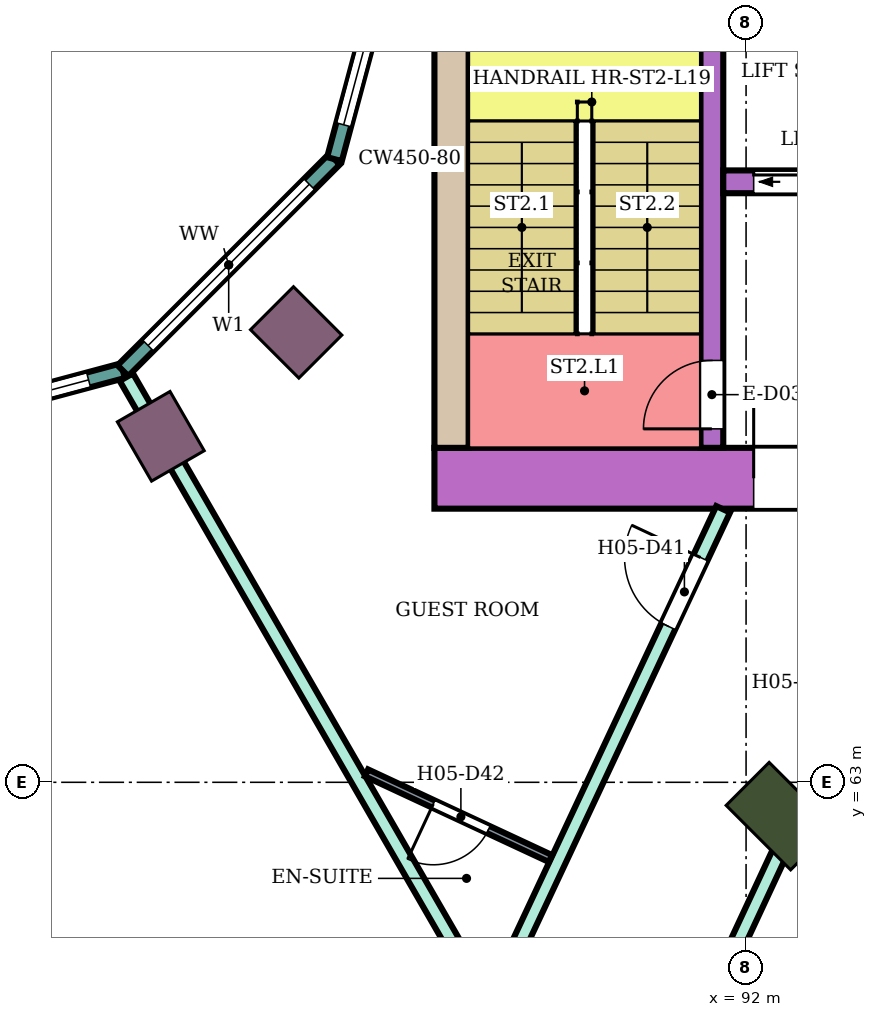
"""IFC4 building model, lengths in metres.
Left out: names, types, materials, properties, quantities, classifications, styles, units other than length and angle.
Written with IfcOpenShell. Run it as: python <this file> out.ifc"""

import sys

from ifc_helpers import new_model, si_unit, direction, frame, frame_2d, origin, origin_2d, place, context, subcontext, project, spatial, rectangle, extrude, element, fill, save


model = new_model("IFC4")
c1 = context("Model", 3, precision=1e-05, world=origin(), true_north=direction((0.0, 1.0)))
c2 = subcontext(c1, "Body", "Model", "MODEL_VIEW")
j1 = project(units=[si_unit("LENGTHUNIT", "METRE"), si_unit("PLANEANGLEUNIT", "RADIAN")], contexts=[c1])
p1 = place(None, origin())
s1 = spatial("IfcSite", under=j1, at=p1, CompositionType="ELEMENT")
p2 = place(p1, origin())
s2 = spatial("IfcBuilding", under=s1, at=p2, CompositionType="ELEMENT")
p3 = place(p2, frame((0.0, 0.0, 86.2)))
s3 = spatial("IfcBuildingStorey", under=s2, at=p3, CompositionType="ELEMENT", Elevation=86.2)
p4 = place(p3, frame((92.445, 62.555, 0.0), z_axis=(0.0, 0.0, 1.0), x_axis=(0.707106781187, -0.707106781187, 0.0)))
e1 = element("IfcColumn", 1, at=p4, inside=s3, PredefinedType="COLUMN", context=c2, shape_type="SweptSolid", body=[
    extrude(rectangle(XDim=1.2, YDim=0.8, at=origin_2d()), origin(), (0.0, 0.0, 1.0), 3.8),
])
for number, where, z_axis, x_axis in (
    (2, (84.3, 67.552, 0.0), (0.0, 0.0, 1.0), (0.5, -0.866, 0.0)),
    (3, (86.081, 68.919, 0.0), (0.0, 0.0, 1.0), (0.707, -0.707, 0.0)),
):
    element("IfcColumn", number, at=place(p3, frame(where, z_axis=z_axis, x_axis=x_axis)), inside=s3, PredefinedType="COLUMN", context=c2, shape_type="SweptSolid", body=[
        extrude(rectangle(XDim=0.9, YDim=0.8, at=origin_2d()), origin(), (0.0, 0.0, 1.0), 3.8),
    ])
p5 = place(p3, frame((87.9, 67.0, 0.0), z_axis=(0.0, 0.0, 1.0), x_axis=(1.0, 0.0, 0.0)))
e4 = element("IfcWall", 4, at=p5, inside=s3, PredefinedType="SHEAR", context=c2, shape_type="SweptSolid", body=[
    extrude(rectangle(XDim=14.7, YDim=0.8, at=frame_2d((7.35, 0.0))), origin(), (0.0, 0.0, 1.0), 3.48),
])
p6 = place(p5, frame((4.2, 0.0, 0.0)))
e5 = element("IfcOpeningElement", 5, at=p6, cuts=e4, PredefinedType="OPENING", context=c2, shape_type="SweptSolid", body=[
    extrude(rectangle(XDim=2.4, YDim=2.4, at=frame_2d((1.2, 1.2))), frame((0.0, 0.41, 0.0), z_axis=(0.0, -1.0, 0.0), x_axis=(1.0, 0.0, 0.0)), (0.0, 0.0, 1.0), 0.82),
])
p7 = place(p3, frame((88.125, 67.4, 0.0), z_axis=(0.0, 0.0, 1.0), x_axis=(0.0, 1.0, 0.0)))
e6 = element("IfcWall", 6, at=p7, inside=s3, PredefinedType="SHEAR", context=c2, shape_type="SweptSolid", body=[
    extrude(rectangle(XDim=7.6, YDim=0.45, at=frame_2d((3.8, 0.0))), origin(), (0.0, 0.0, 1.0), 3.48),
])
p8 = place(p3, frame((91.55, 67.4, 0.0), z_axis=(0.0, 0.0, 1.0), x_axis=(0.0, 1.0, 0.0)))
e7 = element("IfcWall", 7, at=p8, inside=s3, PredefinedType="SHEAR", context=c2, shape_type="SweptSolid", body=[
    extrude(rectangle(XDim=7.6, YDim=0.3, at=frame_2d((3.8, 0.0))), origin(), (0.0, 0.0, 1.0), 3.48),
])
p9 = place(p8, frame((0.25, 0.0, 0.0)))
e8 = element("IfcOpeningElement", 8, at=p9, cuts=e7, PredefinedType="OPENING", context=c2, shape_type="SweptSolid", body=[
    extrude(rectangle(XDim=0.9, YDim=2.1, at=frame_2d((0.45, 1.05))), frame((0.0, 0.16, 0.0), z_axis=(0.0, -1.0, 0.0), x_axis=(1.0, 0.0, 0.0)), (0.0, 0.0, 1.0), 0.32),
])
p10 = place(p3, frame((91.7, 70.9, 0.0), z_axis=(0.0, 0.0, 1.0), x_axis=(1.0, 0.0, 0.0)))
e9 = element("IfcWall", 9, at=p10, inside=s3, PredefinedType="SHEAR", context=c2, shape_type="SweptSolid", body=[
    extrude(rectangle(XDim=10.9, YDim=0.3, at=frame_2d((5.45, 0.0))), origin(), (0.0, 0.0, 1.0), 3.48),
])
p11 = place(p10, frame((0.4, 0.0, 0.0)))
e10 = element("IfcOpeningElement", 10, at=p11, cuts=e9, PredefinedType="OPENING", context=c2, shape_type="SweptSolid", body=[
    extrude(rectangle(XDim=1.4, YDim=2.1, at=frame_2d((0.7, 1.05))), frame((0.0, 0.16, 0.0), z_axis=(0.0, -1.0, 0.0), x_axis=(1.0, 0.0, 0.0)), (0.0, 0.0, 1.0), 0.32),
])
p12 = place(p10, frame((5.4, 0.0, 0.0)))
e11 = element("IfcOpeningElement", 11, at=p12, cuts=e9, PredefinedType="OPENING", context=c2, shape_type="SweptSolid", body=[
    extrude(rectangle(XDim=1.4, YDim=2.1, at=frame_2d((0.7, 1.05))), frame((0.0, 0.16, 0.0), z_axis=(0.0, -1.0, 0.0), x_axis=(1.0, 0.0, 0.0)), (0.0, 0.0, 1.0), 0.32),
])
p13 = place(p10, frame((8.1, 0.0, 0.0)))
e12 = element("IfcOpeningElement", 12, at=p13, cuts=e9, PredefinedType="OPENING", context=c2, shape_type="SweptSolid", body=[
    extrude(rectangle(XDim=1.0, YDim=2.1, at=frame_2d((0.5, 1.05))), frame((0.0, 0.16, 0.0), z_axis=(0.0, -1.0, 0.0), x_axis=(1.0, 0.0, 0.0)), (0.0, 0.0, 1.0), 0.32),
])
p14 = place(p3, frame((80.0, 67.396, 0.0), z_axis=(0.0, 0.0, 1.0), x_axis=(0.965933654434, 0.258789828301, 0.0)))
e13 = element("IfcWall", 13, at=p14, inside=s3, PredefinedType="NOTDEFINED", context=c2, shape_type="SweptSolid", body=[
    extrude(rectangle(XDim=3.936, YDim=0.2, at=frame_2d((1.968, 0.0))), origin(), (0.0, 0.0, 1.0), 3.8),
])
p15 = place(p14, frame((0.468, 0.0, 0.9)))
e14 = element("IfcOpeningElement", 14, at=p15, cuts=e13, PredefinedType="OPENING", context=c2, shape_type="SweptSolid", body=[
    extrude(rectangle(XDim=3.0, YDim=2.3, at=frame_2d((1.5, 1.15))), frame((0.0, 0.11, 0.0), z_axis=(0.0, -1.0, 0.0), x_axis=(1.0, 0.0, 0.0)), (0.0, 0.0, 1.0), 0.22),
])
p16 = place(p3, frame((83.802, 68.415, 0.0), z_axis=(0.0, 0.0, 1.0), x_axis=(0.707106781187, 0.707106781187, 0.0)))
e15 = element("IfcWall", 15, at=p16, inside=s3, PredefinedType="NOTDEFINED", context=c2, shape_type="SweptSolid", body=[
    extrude(rectangle(XDim=3.936, YDim=0.2, at=frame_2d((1.968, 0.0))), origin(), (0.0, 0.0, 1.0), 3.8),
])
p17 = place(p16, frame((0.468, 0.0, 0.9)))
e16 = element("IfcOpeningElement", 16, at=p17, cuts=e15, PredefinedType="OPENING", context=c2, shape_type="SweptSolid", body=[
    extrude(rectangle(XDim=3.0, YDim=2.3, at=frame_2d((1.5, 1.15))), frame((0.0, 0.11, 0.0), z_axis=(0.0, -1.0, 0.0), x_axis=(1.0, 0.0, 0.0)), (0.0, 0.0, 1.0), 0.22),
])
p18 = place(p3, frame((86.585, 71.198, 0.0), z_axis=(0.0, 0.0, 1.0), x_axis=(0.258789828301, 0.965933654434, 0.0)))
e17 = element("IfcWall", 17, at=p18, inside=s3, PredefinedType="NOTDEFINED", context=c2, shape_type="SweptSolid", body=[
    extrude(rectangle(XDim=3.936, YDim=0.2, at=frame_2d((1.968, 0.0))), origin(), (0.0, 0.0, 1.0), 3.8),
])
p19 = place(p18, frame((0.468, 0.0, 0.9)))
e18 = element("IfcOpeningElement", 18, at=p19, cuts=e17, PredefinedType="OPENING", context=c2, shape_type="SweptSolid", body=[
    extrude(rectangle(XDim=3.0, YDim=2.3, at=frame_2d((1.5, 1.15))), frame((0.0, 0.11, 0.0), z_axis=(0.0, -1.0, 0.0), x_axis=(1.0, 0.0, 0.0)), (0.0, 0.0, 1.0), 0.22),
])
p20 = place(p3, frame((83.846, 68.33, 0.0), z_axis=(0.0, 0.0, 1.0), x_axis=(0.499822319857, -0.866127963163, 0.0)))
e19 = element("IfcWall", 19, at=p20, inside=s3, PredefinedType="PARTITIONING", context=c2, shape_type="SweptSolid", body=[
    extrude(rectangle(XDim=9.382, YDim=0.2, at=frame_2d((4.691, 0.0))), origin(), (0.0, 0.0, 1.0), 3.35),
])
p21 = place(p3, frame((88.501, 59.775, 0.0), z_axis=(0.0, 0.0, 1.0), x_axis=(0.424700525505, 0.905333896215, 0.0)))
e20 = element("IfcWall", 20, at=p21, inside=s3, PredefinedType="PARTITIONING", context=c2, shape_type="SweptSolid", body=[
    extrude(rectangle(XDim=7.53, YDim=0.2, at=frame_2d((3.765, 0.0))), origin(), (0.0, 0.0, 1.0), 3.35),
])
p22 = place(p21, frame((5.83, 0.0, 0.0)))
e21 = element("IfcOpeningElement", 21, at=p22, cuts=e20, PredefinedType="OPENING", context=c2, shape_type="SweptSolid", body=[
    extrude(rectangle(XDim=1.0, YDim=2.1, at=frame_2d((0.5, 1.05))), frame((0.0, 0.11, 0.0), z_axis=(0.0, -1.0, 0.0), x_axis=(1.0, 0.0, 0.0)), (0.0, 0.0, 1.0), 0.22),
])
p23 = place(p3, frame((90.346, 57.578, 0.0), z_axis=(0.0, 0.0, 1.0), x_axis=(0.422403412327, 0.906407941964, 0.0)))
e22 = element("IfcWall", 22, at=p23, inside=s3, PredefinedType="PARTITIONING", context=c2, shape_type="SweptSolid", body=[
    extrude(rectangle(XDim=8.208, YDim=0.2, at=frame_2d((4.104, 0.0))), origin(), (0.0, 0.0, 1.0), 3.35),
])
p24 = place(p23, frame((6.351, 0.0, 0.0)))
e23 = element("IfcOpeningElement", 23, at=p24, cuts=e22, PredefinedType="OPENING", context=c2, shape_type="SweptSolid", body=[
    extrude(rectangle(XDim=0.9, YDim=2.1, at=frame_2d((0.45, 1.05))), frame((0.0, 0.11, 0.0), z_axis=(0.0, -1.0, 0.0), x_axis=(1.0, 0.0, 0.0)), (0.0, 0.0, 1.0), 0.22),
])
p25 = place(p23, frame((0.55, 0.0, 0.0)))
e24 = element("IfcOpeningElement", 24, at=p25, cuts=e22, PredefinedType="OPENING", context=c2, shape_type="SweptSolid", body=[
    extrude(rectangle(XDim=1.0, YDim=2.1, at=frame_2d((0.5, 1.05))), frame((0.0, 0.11, 0.0), z_axis=(0.0, -1.0, 0.0), x_axis=(1.0, 0.0, 0.0)), (0.0, 0.0, 1.0), 0.22),
])
p26 = place(p3, frame((92.692, 62.303, 0.0), z_axis=(0.0, 0.0, 1.0), x_axis=(0.706920663731, -0.707292849667, 0.0)))
e25 = element("IfcWall", 25, at=p26, inside=s3, PredefinedType="PARTITIONING", context=c2, shape_type="SweptSolid", body=[
    extrude(rectangle(XDim=5.248, YDim=0.2, at=frame_2d((2.624, 0.0))), origin(), (0.0, 0.0, 1.0), 3.35),
])
p27 = place(p3, frame((87.006, 63.124, 0.0), z_axis=(0.0, 0.0, 1.0), x_axis=(0.906535604863, -0.422129360642, 0.0)))
e26 = element("IfcWall", 26, at=p27, inside=s3, PredefinedType="PARTITIONING", context=c2, shape_type="SweptSolid", body=[
    extrude(rectangle(XDim=2.67, YDim=0.1, at=frame_2d((1.335, 0.0))), origin(), (0.0, 0.0, 1.0), 3.35),
])
p28 = place(p27, frame((0.97, 0.0, 0.0)))
e27 = element("IfcOpeningElement", 27, at=p28, cuts=e26, PredefinedType="OPENING", context=c2, shape_type="SweptSolid", body=[
    extrude(rectangle(XDim=0.8, YDim=2.1, at=frame_2d((0.4, 1.05))), frame((0.0, 0.06, 0.0), z_axis=(0.0, -1.0, 0.0), x_axis=(1.0, 0.0, 0.0)), (0.0, 0.0, 1.0), 0.12),
])
p29 = place(p15, origin())
e28 = element("IfcWindow", 28, at=p29, inside=s3, PartitioningType="SINGLE_PANEL", PredefinedType="WINDOW", context=c2, shape_type="SweptSolid", body=[
    extrude(rectangle(XDim=3.0, YDim=2.3, at=frame_2d((1.5, 1.15))), frame((0.0, 0.03, 0.0), z_axis=(0.0, -1.0, 0.0), x_axis=(1.0, 0.0, 0.0)), (0.0, 0.0, 1.0), 0.06),
])
fill(e14, e28)
p30 = place(p17, origin())
e29 = element("IfcWindow", 29, at=p30, inside=s3, PartitioningType="SINGLE_PANEL", PredefinedType="WINDOW", context=c2, shape_type="SweptSolid", body=[
    extrude(rectangle(XDim=3.0, YDim=2.3, at=frame_2d((1.5, 1.15))), frame((0.0, 0.03, 0.0), z_axis=(0.0, -1.0, 0.0), x_axis=(1.0, 0.0, 0.0)), (0.0, 0.0, 1.0), 0.06),
])
fill(e16, e29)
p31 = place(p19, origin())
e30 = element("IfcWindow", 30, at=p31, inside=s3, PartitioningType="SINGLE_PANEL", PredefinedType="WINDOW", context=c2, shape_type="SweptSolid", body=[
    extrude(rectangle(XDim=3.0, YDim=2.3, at=frame_2d((1.5, 1.15))), frame((0.0, 0.03, 0.0), z_axis=(0.0, -1.0, 0.0), x_axis=(1.0, 0.0, 0.0)), (0.0, 0.0, 1.0), 0.06),
])
fill(e18, e30)
p32 = place(p22, origin())
e31 = element("IfcDoor", 31, at=p32, inside=s3, OperationType="SINGLE_SWING_RIGHT", PredefinedType="DOOR", context=c2, shape_type="SweptSolid", body=[
    extrude(rectangle(XDim=1.0, YDim=2.1, at=frame_2d((0.5, 1.05))), frame((0.0, 0.025, 0.0), z_axis=(0.0, -1.0, 0.0), x_axis=(1.0, 0.0, 0.0)), (0.0, 0.0, 1.0), 0.05),
])
fill(e21, e31)
p33 = place(p28, frame((0.8, 0.0, 0.0), z_axis=(0.0, 0.0, 1.0), x_axis=(-1.0, 0.0, 0.0)))
e32 = element("IfcDoor", 32, at=p33, inside=s3, OperationType="SINGLE_SWING_RIGHT", PredefinedType="DOOR", context=c2, shape_type="SweptSolid", body=[
    extrude(rectangle(XDim=0.8, YDim=2.1, at=frame_2d((0.4, 1.05))), frame((0.0, 0.025, 0.0), z_axis=(0.0, -1.0, 0.0), x_axis=(1.0, 0.0, 0.0)), (0.0, 0.0, 1.0), 0.05),
])
fill(e27, e32)
p34 = place(p9, origin())
e33 = element("IfcDoor", 33, at=p34, inside=s3, OperationType="SINGLE_SWING_LEFT", PredefinedType="DOOR", context=c2, shape_type="SweptSolid", body=[
    extrude(rectangle(XDim=0.9, YDim=2.1, at=frame_2d((0.45, 1.05))), frame((0.0, 0.025, 0.0), z_axis=(0.0, -1.0, 0.0), x_axis=(1.0, 0.0, 0.0)), (0.0, 0.0, 1.0), 0.05),
])
fill(e8, e33)
p35 = place(p11, origin())
e34 = element("IfcDoor", 34, at=p35, inside=s3, OperationType="DOUBLE_DOOR_SLIDING", PredefinedType="DOOR", context=c2, shape_type="SweptSolid", body=[
    extrude(rectangle(XDim=1.4, YDim=2.1, at=frame_2d((0.7, 1.05))), frame((0.0, 0.025, 0.0), z_axis=(0.0, -1.0, 0.0), x_axis=(1.0, 0.0, 0.0)), (0.0, 0.0, 1.0), 0.05),
])
fill(e10, e34)
p36 = place(p6, origin())
e35 = element("IfcDoor", 35, at=p36, inside=s3, OperationType="DOUBLE_DOOR_SINGLE_SWING", PredefinedType="DOOR", context=c2, shape_type="SweptSolid", body=[
    extrude(rectangle(XDim=2.4, YDim=2.4, at=frame_2d((1.2, 1.2))), frame((0.0, 0.025, 0.0), z_axis=(0.0, -1.0, 0.0), x_axis=(1.0, 0.0, 0.0)), (0.0, 0.0, 1.0), 0.05),
])
fill(e5, e35)
save(model, sys.argv[1])
